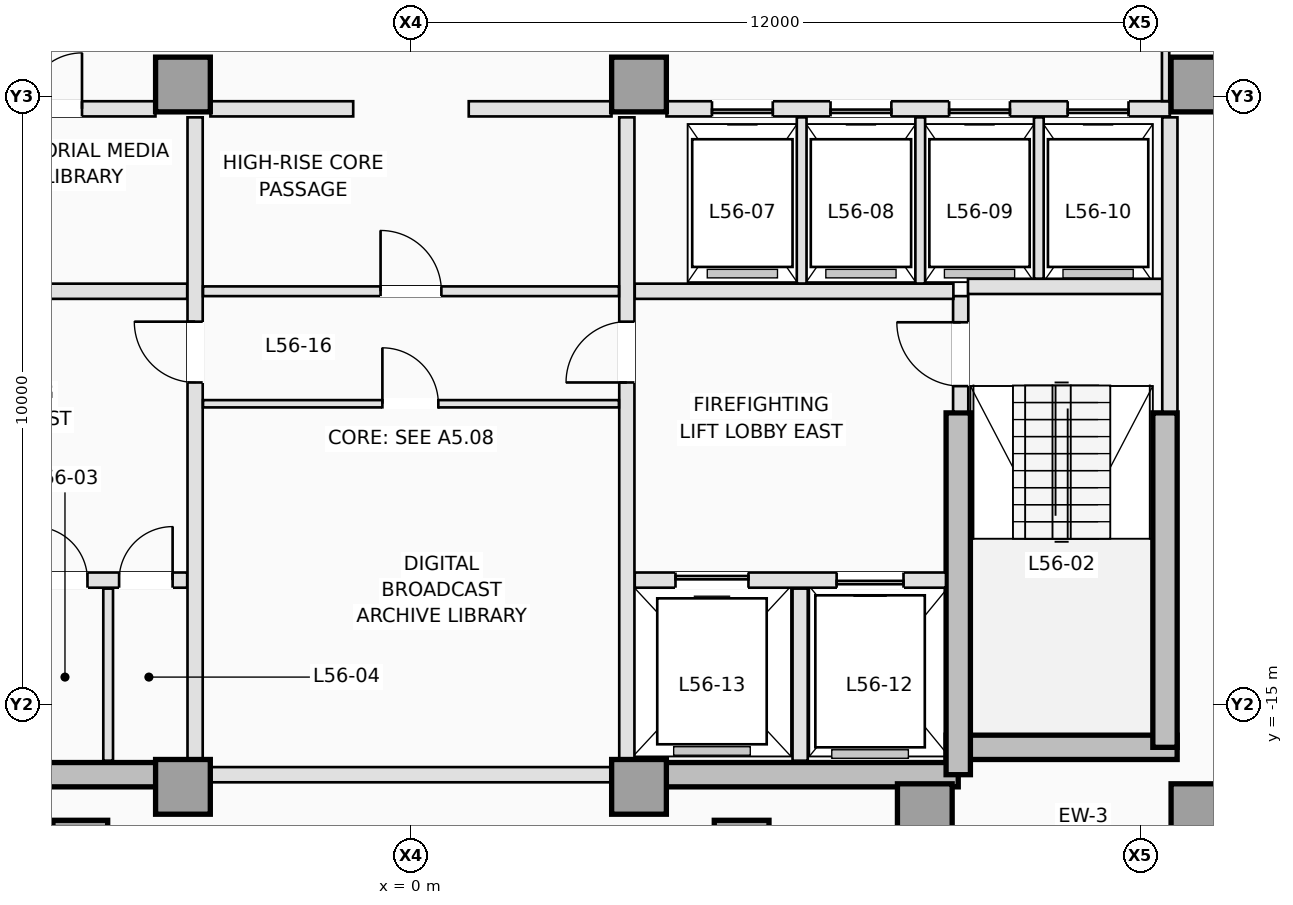
"""IFC4 building model, lengths in metres.
Left out: names, types, materials, properties, quantities, classifications, styles, units other than length and angle.
Written with IfcOpenShell. Run it as: python <this file> out.ifc"""

import sys

from ifc_helpers import new_model, si_unit, direction, frame, frame_2d, origin, origin_2d, place, context, subcontext, project, spatial, rectangle, extrude, element, fill, save


model = new_model("IFC4")
c1 = context("Model", 3, precision=1e-05, world=origin(), true_north=direction((0.0, 1.0)))
c2 = subcontext(c1, "Body", "Model", "MODEL_VIEW")
j1 = project(units=[si_unit("LENGTHUNIT", "METRE"), si_unit("PLANEANGLEUNIT", "RADIAN")], contexts=[c1])
p1 = place(None, origin())
s1 = spatial("IfcSite", under=j1, at=p1, CompositionType="ELEMENT")
p2 = place(p1, origin())
s2 = spatial("IfcBuilding", under=s1, at=p2, CompositionType="ELEMENT")
p3 = place(p2, frame((0.0, 0.0, 204.4)))
s3 = spatial("IfcBuildingStorey", under=s2, at=p3, CompositionType="ELEMENT", Elevation=204.4)
for number, where, z_axis, x_axis in (
    (1, (-9.0, -16.15, 0.0), (0.0, 0.0, 1.0), (1.0, 0.0, 0.0)),
    (2, (3.75, -16.15, 0.0), (0.0, 0.0, 1.0), (1.0, 0.0, 0.0)),
):
    element("IfcWall", number, at=place(p3, frame(where, z_axis=z_axis, x_axis=x_axis)), inside=s3, PredefinedType="SHEAR", context=c2, shape_type="SweptSolid", body=[
        extrude(rectangle(XDim=5.25, YDim=0.4, at=frame_2d((2.625, 0.0))), origin(), (0.0, 0.0, 1.0), 3.5),
    ])
p4 = place(p3, frame((8.8, -15.7, 0.0), z_axis=(0.0, 0.0, 1.0), x_axis=(1.0, 0.0, 0.0)))
e3 = element("IfcWall", 3, at=p4, inside=s3, PredefinedType="SHEAR", context=c2, shape_type="SweptSolid", body=[
    extrude(rectangle(XDim=3.8, YDim=0.4, at=frame_2d((1.9, 0.0))), origin(), (0.0, 0.0, 1.0), 3.5),
])
p5 = place(p3, frame((12.4, -15.7, 0.0), z_axis=(0.0, 0.0, 1.0), x_axis=(0.0, 1.0, 0.0)))
e4 = element("IfcWall", 4, at=p5, inside=s3, PredefinedType="SHEAR", context=c2, shape_type="SweptSolid", body=[
    extrude(rectangle(XDim=5.5, YDim=0.4, at=frame_2d((2.75, 0.0))), origin(), (0.0, 0.0, 1.0), 3.5),
])
p6 = place(p3, frame((9.0, -16.15, 0.0), z_axis=(0.0, 0.0, 1.0), x_axis=(0.0, 1.0, 0.0)))
e5 = element("IfcWall", 5, at=p6, inside=s3, PredefinedType="SHEAR", context=c2, shape_type="SweptSolid", body=[
    extrude(rectangle(XDim=5.95, YDim=0.4, at=frame_2d((2.975, 0.0))), origin(), (0.0, 0.0, 1.0), 3.5),
])
for number, where, z_axis, x_axis in (
    (6, (-3.75, -16.35, 0.0), (0.0, 0.0, 1.0), (1.0, 0.0, 0.0)),
    (7, (3.75, -16.35, 0.0), (0.0, 0.0, 1.0), (1.0, 0.0, 0.0)),
    (8, (8.45, -16.75, 0.0), (0.0, 0.0, 1.0), (1.0, 0.0, 0.0)),
    (9, (12.95, -16.75, 0.0), (0.0, 0.0, 1.0), (1.0, 0.0, 0.0)),
    (10, (-3.75, -4.8, 0.0), (0.0, 0.0, 1.0), (1.0, 0.0, 0.0)),
    (11, (3.75, -4.8, 0.0), (0.0, 0.0, 1.0), (1.0, 0.0, 0.0)),
    (12, (12.95, -4.8, 0.0), (0.0, 0.0, 1.0), (1.0, 0.0, 0.0)),
    (13, (-5.438, -17.35, 0.0), (0.0, 0.0, 1.0), (0.0, 1.0, 0.0)),
    (14, (5.438, -17.35, 0.0), (0.0, 0.0, 1.0), (0.0, 1.0, 0.0)),
):
    element("IfcColumn", number, at=place(p3, frame(where, z_axis=z_axis, x_axis=x_axis)), inside=s3, PredefinedType="COLUMN", context=c2, shape_type="SweptSolid", body=[
        extrude(rectangle(XDim=0.9, YDim=0.9, at=origin_2d()), origin(), (0.0, 0.0, 1.0), 3.5),
    ])
p7 = place(p3, frame((9.04, -10.18, 0.0), z_axis=(0.0, 0.0, 1.0), x_axis=(0.0, 1.0, 0.0)))
e15 = element("IfcWall", 15, at=p7, inside=s3, PredefinedType="PARTITIONING", context=c2, shape_type="SweptSolid", body=[
    extrude(rectangle(XDim=1.9, YDim=0.25, at=frame_2d((0.95, 0.0))), origin(), (0.0, 0.0, 1.0), 3.25),
])
p8 = place(p7, frame((0.42, 0.0, 0.0)))
e16 = element("IfcOpeningElement", 16, at=p8, cuts=e15, PredefinedType="OPENING", context=c2, shape_type="SweptSolid", body=[
    extrude(rectangle(XDim=1.05, YDim=2.15, at=frame_2d((0.525, 1.075))), frame((0.0, 0.135, 0.0), z_axis=(0.0, -1.0, 0.0), x_axis=(1.0, 0.0, 0.0)), (0.0, 0.0, 1.0), 0.27),
])
p9 = place(p3, frame((9.16, -8.12, 0.0), z_axis=(0.0, 0.0, 1.0), x_axis=(1.0, 0.0, 0.0)))
e17 = element("IfcWall", 17, at=p9, inside=s3, PredefinedType="PARTITIONING", context=c2, shape_type="SweptSolid", body=[
    extrude(rectangle(XDim=3.22, YDim=0.25, at=frame_2d((1.61, 0.0))), origin(), (0.0, 0.0, 1.0), 3.25),
])
p10 = place(p3, frame((12.48, -10.18, 0.0), z_axis=(0.0, 0.0, 1.0), x_axis=(0.0, 1.0, 0.0)))
e18 = element("IfcWall", 18, at=p10, inside=s3, PredefinedType="PARTITIONING", context=c2, shape_type="SweptSolid", body=[
    extrude(rectangle(XDim=4.84, YDim=0.25, at=frame_2d((2.42, 0.0))), origin(), (0.0, 0.0, 1.0), 3.25),
])
p11 = place(p3, frame((-8.798, -12.95, 0.0), z_axis=(0.0, 0.0, 1.0), x_axis=(1.0, 0.0, 0.0)))
e19 = element("IfcWall", 19, at=p11, inside=s3, PredefinedType="PARTITIONING", context=c2, shape_type="SweptSolid", body=[
    extrude(rectangle(XDim=5.118, YDim=0.25, at=frame_2d((2.559, 0.0))), origin(), (0.0, 0.0, 1.0), 3.25),
])
p12 = place(p11, frame((0.698, 0.0, 0.0)))
e20 = element("IfcOpeningElement", 20, at=p12, cuts=e19, PredefinedType="OPENING", context=c2, shape_type="SweptSolid", body=[
    extrude(rectangle(XDim=1.1, YDim=2.15, at=frame_2d((0.55, 1.075))), frame((0.0, 0.135, 0.0), z_axis=(0.0, -1.0, 0.0), x_axis=(1.0, 0.0, 0.0)), (0.0, 0.0, 1.0), 0.27),
])
p13 = place(p11, frame((2.598, 0.0, 0.0)))
e21 = element("IfcOpeningElement", 21, at=p13, cuts=e19, PredefinedType="OPENING", context=c2, shape_type="SweptSolid", body=[
    extrude(rectangle(XDim=0.88, YDim=2.1, at=frame_2d((0.44, 1.05))), frame((0.0, 0.135, 0.0), z_axis=(0.0, -1.0, 0.0), x_axis=(1.0, 0.0, 0.0)), (0.0, 0.0, 1.0), 0.27),
])
p14 = place(p11, frame((3.998, 0.0, 0.0)))
e22 = element("IfcOpeningElement", 22, at=p14, cuts=e19, PredefinedType="OPENING", context=c2, shape_type="SweptSolid", body=[
    extrude(rectangle(XDim=0.88, YDim=2.1, at=frame_2d((0.44, 1.05))), frame((0.0, 0.135, 0.0), z_axis=(0.0, -1.0, 0.0), x_axis=(1.0, 0.0, 0.0)), (0.0, 0.0, 1.0), 0.27),
])
p15 = place(p3, frame((3.68, -12.95, 0.0), z_axis=(0.0, 0.0, 1.0), x_axis=(1.0, 0.0, 0.0)))
e23 = element("IfcWall", 23, at=p15, inside=s3, PredefinedType="PARTITIONING", context=c2, shape_type="SweptSolid", body=[
    extrude(rectangle(XDim=5.118, YDim=0.25, at=frame_2d((2.559, 0.0))), origin(), (0.0, 0.0, 1.0), 3.25),
])
p16 = place(p15, frame((3.32, 0.0, 0.0)))
e24 = element("IfcOpeningElement", 24, at=p16, cuts=e23, PredefinedType="OPENING", context=c2, shape_type="SweptSolid", body=[
    extrude(rectangle(XDim=1.1, YDim=2.15, at=frame_2d((0.55, 1.075))), frame((0.0, 0.135, 0.0), z_axis=(0.0, -1.0, 0.0), x_axis=(1.0, 0.0, 0.0)), (0.0, 0.0, 1.0), 0.27),
])
p17 = place(p15, frame((0.67, 0.0, 0.0)))
e25 = element("IfcOpeningElement", 25, at=p17, cuts=e23, PredefinedType="OPENING", context=c2, shape_type="SweptSolid", body=[
    extrude(rectangle(XDim=1.2, YDim=2.15, at=frame_2d((0.6, 1.075))), frame((0.0, 0.135, 0.0), z_axis=(0.0, -1.0, 0.0), x_axis=(1.0, 0.0, 0.0)), (0.0, 0.0, 1.0), 0.27),
])
p18 = place(p3, frame((-4.98, -15.92, 0.0), z_axis=(0.0, 0.0, 1.0), x_axis=(0.0, 1.0, 0.0)))
e26 = element("IfcWall", 26, at=p18, inside=s3, PredefinedType="PARTITIONING", context=c2, shape_type="SweptSolid", body=[
    extrude(rectangle(XDim=2.83, YDim=0.16, at=frame_2d((1.415, 0.0))), origin(), (0.0, 0.0, 1.0), 3.25),
])
p19 = place(p3, frame((6.4, -15.92, 0.0), z_axis=(0.0, 0.0, 1.0), x_axis=(0.0, 1.0, 0.0)))
e27 = element("IfcWall", 27, at=p19, inside=s3, PredefinedType="PARTITIONING", context=c2, shape_type="SweptSolid", body=[
    extrude(rectangle(XDim=2.83, YDim=0.25, at=frame_2d((1.415, 0.0))), origin(), (0.0, 0.0, 1.0), 3.25),
])
for number, where, z_axis, x_axis in (
    (28, (-8.92, -8.2, 0.0), (0.0, 0.0, 1.0), (1.0, 0.0, 0.0)),
    (29, (3.68, -8.2, 0.0), (0.0, 0.0, 1.0), (1.0, 0.0, 0.0)),
):
    element("IfcWall", number, at=place(p3, frame(where, z_axis=z_axis, x_axis=x_axis)), inside=s3, PredefinedType="PARTITIONING", context=c2, shape_type="SweptSolid", body=[
        extrude(rectangle(XDim=5.24, YDim=0.25, at=frame_2d((2.62, 0.0))), origin(), (0.0, 0.0, 1.0), 3.25),
    ])
p20 = place(p3, frame((-3.55, -15.898, 0.0), z_axis=(0.0, 0.0, 1.0), x_axis=(0.0, 1.0, 0.0)))
e30 = element("IfcWall", 30, at=p20, inside=s3, PredefinedType="PARTITIONING", context=c2, shape_type="SweptSolid", body=[
    extrude(rectangle(XDim=10.558, YDim=0.25, at=frame_2d((5.279, 0.0))), origin(), (0.0, 0.0, 1.0), 3.25),
])
p21 = place(p20, frame((6.198, 0.0, 0.0)))
e31 = element("IfcOpeningElement", 31, at=p21, cuts=e30, PredefinedType="OPENING", context=c2, shape_type="SweptSolid", body=[
    extrude(rectangle(XDim=1.0, YDim=2.15, at=frame_2d((0.5, 1.075))), frame((0.0, 0.135, 0.0), z_axis=(0.0, -1.0, 0.0), x_axis=(1.0, 0.0, 0.0)), (0.0, 0.0, 1.0), 0.27),
])
p22 = place(p3, frame((3.55, -15.898, 0.0), z_axis=(0.0, 0.0, 1.0), x_axis=(0.0, 1.0, 0.0)))
e32 = element("IfcWall", 32, at=p22, inside=s3, PredefinedType="PARTITIONING", context=c2, shape_type="SweptSolid", body=[
    extrude(rectangle(XDim=10.558, YDim=0.25, at=frame_2d((5.279, 0.0))), origin(), (0.0, 0.0, 1.0), 3.25),
])
p23 = place(p22, frame((6.198, 0.0, 0.0)))
e33 = element("IfcOpeningElement", 33, at=p23, cuts=e32, PredefinedType="OPENING", context=c2, shape_type="SweptSolid", body=[
    extrude(rectangle(XDim=1.0, YDim=2.15, at=frame_2d((0.5, 1.075))), frame((0.0, 0.135, 0.0), z_axis=(0.0, -1.0, 0.0), x_axis=(1.0, 0.0, 0.0)), (0.0, 0.0, 1.0), 0.27),
])
p24 = place(p3, frame((-12.48, -5.2, 0.0), z_axis=(0.0, 0.0, 1.0), x_axis=(1.0, 0.0, 0.0)))
e34 = element("IfcWall", 34, at=p24, inside=s3, PredefinedType="PARTITIONING", context=c2, shape_type="SweptSolid", body=[
    extrude(rectangle(XDim=8.278, YDim=0.25, at=frame_2d((4.139, 0.0))), origin(), (0.0, 0.0, 1.0), 3.25),
])
p25 = place(p24, frame((3.05, 0.0, 0.0)))
e35 = element("IfcOpeningElement", 35, at=p25, cuts=e34, PredefinedType="OPENING", context=c2, shape_type="SweptSolid", body=[
    extrude(rectangle(XDim=0.92, YDim=2.12, at=frame_2d((0.46, 1.06))), frame((0.0, 0.135, 0.0), z_axis=(0.0, -1.0, 0.0), x_axis=(1.0, 0.0, 0.0)), (0.0, 0.0, 1.0), 0.27),
])
p26 = place(p24, frame((6.15, 0.0, 0.0)))
e36 = element("IfcOpeningElement", 36, at=p26, cuts=e34, PredefinedType="OPENING", context=c2, shape_type="SweptSolid", body=[
    extrude(rectangle(XDim=0.92, YDim=2.12, at=frame_2d((0.46, 1.06))), frame((0.0, 0.135, 0.0), z_axis=(0.0, -1.0, 0.0), x_axis=(1.0, 0.0, 0.0)), (0.0, 0.0, 1.0), 0.27),
])
p27 = place(p3, frame((4.202, -5.2, 0.0), z_axis=(0.0, 0.0, 1.0), x_axis=(1.0, 0.0, 0.0)))
e37 = element("IfcWall", 37, at=p27, inside=s3, PredefinedType="PARTITIONING", context=c2, shape_type="SweptSolid", body=[
    extrude(rectangle(XDim=8.278, YDim=0.25, at=frame_2d((4.139, 0.0))), origin(), (0.0, 0.0, 1.0), 3.25),
])
p28 = place(p27, frame((0.748, 0.0, 0.0)))
e38 = element("IfcOpeningElement", 38, at=p28, cuts=e37, PredefinedType="OPENING", context=c2, shape_type="SweptSolid", body=[
    extrude(rectangle(XDim=1.0, YDim=2.15, at=frame_2d((0.5, 1.075))), frame((0.0, 0.135, 0.0), z_axis=(0.0, -1.0, 0.0), x_axis=(1.0, 0.0, 0.0)), (0.0, 0.0, 1.0), 0.27),
])
p29 = place(p27, frame((2.698, 0.0, 0.0)))
e39 = element("IfcOpeningElement", 39, at=p29, cuts=e37, PredefinedType="OPENING", context=c2, shape_type="SweptSolid", body=[
    extrude(rectangle(XDim=1.0, YDim=2.15, at=frame_2d((0.5, 1.075))), frame((0.0, 0.135, 0.0), z_axis=(0.0, -1.0, 0.0), x_axis=(1.0, 0.0, 0.0)), (0.0, 0.0, 1.0), 0.27),
])
p30 = place(p27, frame((4.648, 0.0, 0.0)))
e40 = element("IfcOpeningElement", 40, at=p30, cuts=e37, PredefinedType="OPENING", context=c2, shape_type="SweptSolid", body=[
    extrude(rectangle(XDim=1.0, YDim=2.15, at=frame_2d((0.5, 1.075))), frame((0.0, 0.135, 0.0), z_axis=(0.0, -1.0, 0.0), x_axis=(1.0, 0.0, 0.0)), (0.0, 0.0, 1.0), 0.27),
])
p31 = place(p27, frame((6.598, 0.0, 0.0)))
e41 = element("IfcOpeningElement", 41, at=p31, cuts=e37, PredefinedType="OPENING", context=c2, shape_type="SweptSolid", body=[
    extrude(rectangle(XDim=1.0, YDim=2.15, at=frame_2d((0.5, 1.075))), frame((0.0, 0.135, 0.0), z_axis=(0.0, -1.0, 0.0), x_axis=(1.0, 0.0, 0.0)), (0.0, 0.0, 1.0), 0.27),
])
for number, where, z_axis, x_axis in (
    (42, (-3.298, -5.2, 0.0), (0.0, 0.0, 1.0), (1.0, 0.0, 0.0)),
    (43, (0.95, -5.2, 0.0), (0.0, 0.0, 1.0), (1.0, 0.0, 0.0)),
):
    element("IfcWall", number, at=place(p3, frame(where, z_axis=z_axis, x_axis=x_axis)), inside=s3, PredefinedType="PARTITIONING", context=c2, shape_type="SweptSolid", body=[
        extrude(rectangle(XDim=2.348, YDim=0.25, at=frame_2d((1.174, 0.0))), origin(), (0.0, 0.0, 1.0), 3.25),
    ])
for number, where, z_axis, x_axis in (
    (44, (6.425, -8.073, 0.0), (0.0, 0.0, 1.0), (0.0, 1.0, 0.0)),
    (45, (8.375, -8.073, 0.0), (0.0, 0.0, 1.0), (0.0, 1.0, 0.0)),
):
    element("IfcWall", number, at=place(p3, frame(where, z_axis=z_axis, x_axis=x_axis)), inside=s3, PredefinedType="PARTITIONING", context=c2, shape_type="SweptSolid", body=[
        extrude(rectangle(XDim=2.733, YDim=0.16, at=frame_2d((1.366, 0.0))), origin(), (0.0, 0.0, 1.0), 3.25),
    ])
p32 = place(p3, frame((10.325, -7.993, 0.0), z_axis=(0.0, 0.0, 1.0), x_axis=(0.0, 1.0, 0.0)))
e46 = element("IfcWall", 46, at=p32, inside=s3, PredefinedType="PARTITIONING", context=c2, shape_type="SweptSolid", body=[
    extrude(rectangle(XDim=2.653, YDim=0.16, at=frame_2d((1.326, 0.0))), origin(), (0.0, 0.0, 1.0), 3.25),
])
p33 = place(p3, frame((-3.298, -16.15, 0.0), z_axis=(0.0, 0.0, 1.0), x_axis=(1.0, 0.0, 0.0)))
e47 = element("IfcWall", 47, at=p33, inside=s3, PredefinedType="PARTITIONING", context=c2, shape_type="SweptSolid", body=[
    extrude(rectangle(XDim=6.596, YDim=0.25, at=frame_2d((3.298, 0.0))), origin(), (0.0, 0.0, 1.0), 2.45),
])
p34 = place(p3, frame((-3.42, -8.2, 0.0), z_axis=(0.0, 0.0, 1.0), x_axis=(1.0, 0.0, 0.0)))
e48 = element("IfcWall", 48, at=p34, inside=s3, PredefinedType="PARTITIONING", context=c2, shape_type="SweptSolid", body=[
    extrude(rectangle(XDim=6.84, YDim=0.16, at=frame_2d((3.42, 0.0))), origin(), (0.0, 0.0, 1.0), 3.25),
])
p35 = place(p34, frame((2.92, 0.0, 0.0)))
e49 = element("IfcOpeningElement", 49, at=p35, cuts=e48, PredefinedType="OPENING", context=c2, shape_type="SweptSolid", body=[
    extrude(rectangle(XDim=1.0, YDim=2.15, at=frame_2d((0.5, 1.075))), frame((0.0, 0.09, 0.0), z_axis=(0.0, -1.0, 0.0), x_axis=(1.0, 0.0, 0.0)), (0.0, 0.0, 1.0), 0.18),
])
p36 = place(p3, frame((-3.42, -10.05, 0.0), z_axis=(0.0, 0.0, 1.0), x_axis=(1.0, 0.0, 0.0)))
e50 = element("IfcWall", 50, at=p36, inside=s3, PredefinedType="PARTITIONING", context=c2, shape_type="SweptSolid", body=[
    extrude(rectangle(XDim=6.84, YDim=0.12, at=frame_2d((3.42, 0.0))), origin(), (0.0, 0.0, 1.0), 3.25),
])
p37 = place(p36, frame((2.95, 0.0, 0.0)))
e51 = element("IfcOpeningElement", 51, at=p37, cuts=e50, PredefinedType="OPENING", context=c2, shape_type="SweptSolid", body=[
    extrude(rectangle(XDim=0.92, YDim=2.12, at=frame_2d((0.46, 1.06))), frame((0.0, 0.07, 0.0), z_axis=(0.0, -1.0, 0.0), x_axis=(1.0, 0.0, 0.0)), (0.0, 0.0, 1.0), 0.14),
])
p38 = place(p3, frame((12.41, -2.462, 0.0), z_axis=(0.0, 0.0, 1.0), x_axis=(0.0, -1.0, 0.0)))
e52 = element("IfcWall", 52, at=p38, inside=s3, PredefinedType="PARTITIONING", context=c2, shape_type="SweptSolid", body=[
    extrude(rectangle(XDim=2.611, YDim=0.12, at=frame_2d((1.306, 0.0))), origin(), (0.0, 0.0, 1.0), 3.25),
])
p39 = place(p28, origin())
e53 = element("IfcDoor", 53, at=p39, inside=s3, OperationType="SLIDING_TO_RIGHT", PredefinedType="DOOR", context=c2, shape_type="SweptSolid", body=[
    extrude(rectangle(XDim=1.0, YDim=2.15, at=frame_2d((0.5, 1.075))), frame((0.0, 0.025, 0.0), z_axis=(0.0, -1.0, 0.0), x_axis=(1.0, 0.0, 0.0)), (0.0, 0.0, 1.0), 0.05),
])
fill(e38, e53)
p40 = place(p29, origin())
e54 = element("IfcDoor", 54, at=p40, inside=s3, OperationType="SLIDING_TO_RIGHT", PredefinedType="DOOR", context=c2, shape_type="SweptSolid", body=[
    extrude(rectangle(XDim=1.0, YDim=2.15, at=frame_2d((0.5, 1.075))), frame((0.0, 0.025, 0.0), z_axis=(0.0, -1.0, 0.0), x_axis=(1.0, 0.0, 0.0)), (0.0, 0.0, 1.0), 0.05),
])
fill(e39, e54)
p41 = place(p30, origin())
e55 = element("IfcDoor", 55, at=p41, inside=s3, OperationType="SLIDING_TO_RIGHT", PredefinedType="DOOR", context=c2, shape_type="SweptSolid", body=[
    extrude(rectangle(XDim=1.0, YDim=2.15, at=frame_2d((0.5, 1.075))), frame((0.0, 0.025, 0.0), z_axis=(0.0, -1.0, 0.0), x_axis=(1.0, 0.0, 0.0)), (0.0, 0.0, 1.0), 0.05),
])
fill(e40, e55)
p42 = place(p31, origin())
e56 = element("IfcDoor", 56, at=p42, inside=s3, OperationType="SLIDING_TO_RIGHT", PredefinedType="DOOR", context=c2, shape_type="SweptSolid", body=[
    extrude(rectangle(XDim=1.0, YDim=2.15, at=frame_2d((0.5, 1.075))), frame((0.0, 0.025, 0.0), z_axis=(0.0, -1.0, 0.0), x_axis=(1.0, 0.0, 0.0)), (0.0, 0.0, 1.0), 0.05),
])
fill(e41, e56)
p43 = place(p16, origin())
e57 = element("IfcDoor", 57, at=p43, inside=s3, OperationType="SLIDING_TO_RIGHT", PredefinedType="DOOR", context=c2, shape_type="SweptSolid", body=[
    extrude(rectangle(XDim=1.1, YDim=2.15, at=frame_2d((0.55, 1.075))), frame((0.0, 0.025, 0.0), z_axis=(0.0, -1.0, 0.0), x_axis=(1.0, 0.0, 0.0)), (0.0, 0.0, 1.0), 0.05),
])
fill(e24, e57)
p44 = place(p17, origin())
e58 = element("IfcDoor", 58, at=p44, inside=s3, OperationType="SLIDING_TO_LEFT", PredefinedType="DOOR", context=c2, shape_type="SweptSolid", body=[
    extrude(rectangle(XDim=1.2, YDim=2.15, at=frame_2d((0.6, 1.075))), frame((0.0, 0.025, 0.0), z_axis=(0.0, -1.0, 0.0), x_axis=(1.0, 0.0, 0.0)), (0.0, 0.0, 1.0), 0.05),
])
fill(e25, e58)
p45 = place(p8, origin())
e59 = element("IfcDoor", 59, at=p45, inside=s3, OperationType="SINGLE_SWING_RIGHT", PredefinedType="DOOR", context=c2, shape_type="SweptSolid", body=[
    extrude(rectangle(XDim=1.05, YDim=2.15, at=frame_2d((0.525, 1.075))), frame((0.0, 0.025, 0.0), z_axis=(0.0, -1.0, 0.0), x_axis=(1.0, 0.0, 0.0)), (0.0, 0.0, 1.0), 0.05),
])
fill(e16, e59)
p46 = place(p13, origin())
e60 = element("IfcDoor", 60, at=p46, inside=s3, OperationType="SINGLE_SWING_LEFT", PredefinedType="TRAPDOOR", context=c2, shape_type="SweptSolid", body=[
    extrude(rectangle(XDim=0.88, YDim=2.1, at=frame_2d((0.44, 1.05))), frame((0.0, 0.025, 0.0), z_axis=(0.0, -1.0, 0.0), x_axis=(1.0, 0.0, 0.0)), (0.0, 0.0, 1.0), 0.05),
])
fill(e21, e60)
p47 = place(p14, origin())
e61 = element("IfcDoor", 61, at=p47, inside=s3, OperationType="SINGLE_SWING_RIGHT", PredefinedType="TRAPDOOR", context=c2, shape_type="SweptSolid", body=[
    extrude(rectangle(XDim=0.88, YDim=2.1, at=frame_2d((0.44, 1.05))), frame((0.0, 0.025, 0.0), z_axis=(0.0, -1.0, 0.0), x_axis=(1.0, 0.0, 0.0)), (0.0, 0.0, 1.0), 0.05),
])
fill(e22, e61)
p48 = place(p21, origin())
e62 = element("IfcDoor", 62, at=p48, inside=s3, OperationType="SINGLE_SWING_RIGHT", PredefinedType="DOOR", context=c2, shape_type="SweptSolid", body=[
    extrude(rectangle(XDim=1.0, YDim=2.15, at=frame_2d((0.5, 1.075))), frame((0.0, 0.025, 0.0), z_axis=(0.0, -1.0, 0.0), x_axis=(1.0, 0.0, 0.0)), (0.0, 0.0, 1.0), 0.05),
])
fill(e31, e62)
p49 = place(p23, origin())
e63 = element("IfcDoor", 63, at=p49, inside=s3, OperationType="SINGLE_SWING_LEFT", PredefinedType="DOOR", context=c2, shape_type="SweptSolid", body=[
    extrude(rectangle(XDim=1.0, YDim=2.15, at=frame_2d((0.5, 1.075))), frame((0.0, 0.025, 0.0), z_axis=(0.0, -1.0, 0.0), x_axis=(1.0, 0.0, 0.0)), (0.0, 0.0, 1.0), 0.05),
])
fill(e33, e63)
p50 = place(p26, origin())
e64 = element("IfcDoor", 64, at=p50, inside=s3, OperationType="SINGLE_SWING_RIGHT", PredefinedType="DOOR", context=c2, shape_type="SweptSolid", body=[
    extrude(rectangle(XDim=0.92, YDim=2.12, at=frame_2d((0.46, 1.06))), frame((0.0, 0.025, 0.0), z_axis=(0.0, -1.0, 0.0), x_axis=(1.0, 0.0, 0.0)), (0.0, 0.0, 1.0), 0.05),
])
fill(e36, e64)
p51 = place(p35, origin())
e65 = element("IfcDoor", 65, at=p51, inside=s3, OperationType="SINGLE_SWING_LEFT", PredefinedType="DOOR", context=c2, shape_type="SweptSolid", body=[
    extrude(rectangle(XDim=1.0, YDim=2.15, at=frame_2d((0.5, 1.075))), frame((0.0, 0.025, 0.0), z_axis=(0.0, -1.0, 0.0), x_axis=(1.0, 0.0, 0.0)), (0.0, 0.0, 1.0), 0.05),
])
fill(e49, e65)
p52 = place(p37, origin())
e66 = element("IfcDoor", 66, at=p52, inside=s3, OperationType="SINGLE_SWING_LEFT", PredefinedType="DOOR", context=c2, shape_type="SweptSolid", body=[
    extrude(rectangle(XDim=0.92, YDim=2.12, at=frame_2d((0.46, 1.06))), frame((0.0, 0.025, 0.0), z_axis=(0.0, -1.0, 0.0), x_axis=(1.0, 0.0, 0.0)), (0.0, 0.0, 1.0), 0.05),
])
fill(e51, e66)
save(model, sys.argv[1])
